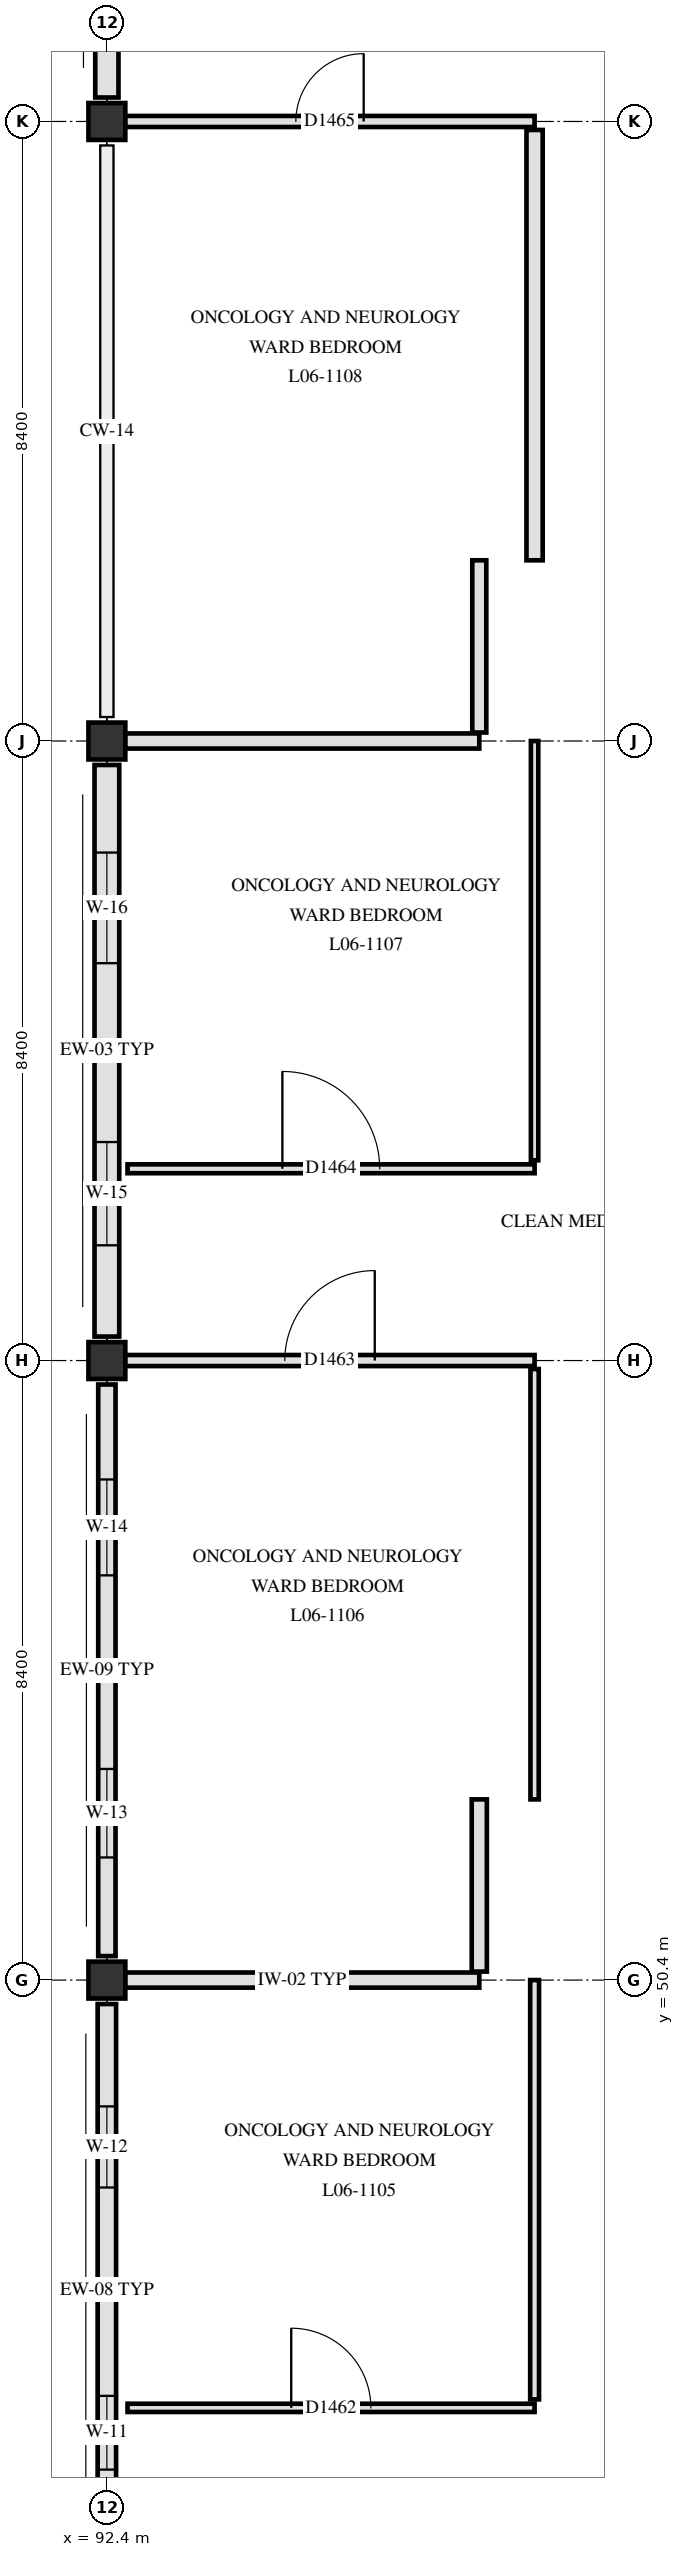
"""IFC4 building model, lengths in metres.
Left out: names, types, materials, properties, quantities, classifications, styles, units other than length and angle.
Written with IfcOpenShell. Run it as: python <this file> out.ifc"""

import sys

from ifc_helpers import new_model, si_unit, direction, frame, frame_2d, origin, origin_2d, place, context, subcontext, project, spatial, rectangle, extrude, element, fill, save


model = new_model("IFC4")
c1 = context("Model", 3, precision=1e-05, world=origin(), true_north=direction((0.0, 1.0)))
c2 = subcontext(c1, "Body", "Model", "MODEL_VIEW")
j1 = project(units=[si_unit("LENGTHUNIT", "METRE"), si_unit("PLANEANGLEUNIT", "RADIAN")], contexts=[c1])
p1 = place(None, origin())
s1 = spatial("IfcSite", under=j1, at=p1, CompositionType="ELEMENT")
p2 = place(p1, origin())
s2 = spatial("IfcBuilding", under=s1, at=p2, CompositionType="ELEMENT")
p3 = place(p2, frame((0.0, 0.0, 26.4)))
s3 = spatial("IfcBuildingStorey", under=s2, at=p3, CompositionType="ELEMENT", Elevation=26.4)
for number, where, z_axis, x_axis in (
    (1, (92.4, 50.4, 0.0), (0.0, 0.0, 1.0), (1.0, 0.0, 0.0)),
    (2, (92.4, 58.8, 0.0), (0.0, 0.0, 1.0), (1.0, 0.0, 0.0)),
    (3, (92.4, 67.2, 0.0), (0.0, 0.0, 1.0), (1.0, 0.0, 0.0)),
    (4, (92.4, 75.6, 0.0), (0.0, 0.0, 1.0), (1.0, 0.0, 0.0)),
):
    element("IfcColumn", number, at=place(p3, frame(where, z_axis=z_axis, x_axis=x_axis)), inside=s3, PredefinedType="COLUMN", context=c2, shape_type="SweptSolid", body=[
        extrude(rectangle(XDim=0.5, YDim=0.5, at=origin_2d()), origin(), (0.0, 0.0, 1.0), 3.9),
    ])
p4 = place(p3, frame((92.4, 42.325, 0.0), z_axis=(0.0, 0.0, 1.0), x_axis=(0.0, 1.0, 0.0)))
e5 = element("IfcWall", 5, at=p4, inside=s3, PredefinedType="SOLIDWALL", context=c2, shape_type="SweptSolid", body=[
    extrude(rectangle(XDim=7.75, YDim=0.25, at=frame_2d((3.875, 0.0))), origin(), (0.0, 0.0, 1.0), 3.38),
])
p5 = place(p4, frame((1.438, 0.0, 0.85)))
e6 = element("IfcOpeningElement", 6, at=p5, cuts=e5, PredefinedType="OPENING", context=c2, shape_type="SweptSolid", body=[
    extrude(rectangle(XDim=1.0, YDim=1.42, at=frame_2d((0.5, 0.71))), frame((0.0, 0.135, 0.0), z_axis=(0.0, -1.0, 0.0), x_axis=(1.0, 0.0, 0.0)), (0.0, 0.0, 1.0), 0.27),
])
p6 = place(p4, frame((5.262, 0.0, 0.85)))
e7 = element("IfcOpeningElement", 7, at=p6, cuts=e5, PredefinedType="OPENING", context=c2, shape_type="SweptSolid", body=[
    extrude(rectangle(XDim=1.1, YDim=1.42, at=frame_2d((0.55, 0.71))), frame((0.0, 0.135, 0.0), z_axis=(0.0, -1.0, 0.0), x_axis=(1.0, 0.0, 0.0)), (0.0, 0.0, 1.0), 0.27),
])
p7 = place(p3, frame((92.4, 50.725, 0.0), z_axis=(0.0, 0.0, 1.0), x_axis=(0.0, 1.0, 0.0)))
e8 = element("IfcWall", 8, at=p7, inside=s3, PredefinedType="SOLIDWALL", context=c2, shape_type="SweptSolid", body=[
    extrude(rectangle(XDim=7.75, YDim=0.235, at=frame_2d((3.875, 0.0))), origin(), (0.0, 0.0, 1.0), 3.38),
])
p8 = place(p7, frame((1.337, 0.0, 0.85)))
e9 = element("IfcOpeningElement", 9, at=p8, cuts=e8, PredefinedType="OPENING", context=c2, shape_type="SweptSolid", body=[
    extrude(rectangle(XDim=1.2, YDim=1.42, at=frame_2d((0.6, 0.71))), frame((0.0, 0.127, 0.0), z_axis=(0.0, -1.0, 0.0), x_axis=(1.0, 0.0, 0.0)), (0.0, 0.0, 1.0), 0.255),
])
p9 = place(p7, frame((5.163, 0.0, 0.85)))
e10 = element("IfcOpeningElement", 10, at=p9, cuts=e8, PredefinedType="OPENING", context=c2, shape_type="SweptSolid", body=[
    extrude(rectangle(XDim=1.3, YDim=1.42, at=frame_2d((0.65, 0.71))), frame((0.0, 0.127, 0.0), z_axis=(0.0, -1.0, 0.0), x_axis=(1.0, 0.0, 0.0)), (0.0, 0.0, 1.0), 0.255),
])
p10 = place(p3, frame((92.4, 59.125, 0.0), z_axis=(0.0, 0.0, 1.0), x_axis=(0.0, 1.0, 0.0)))
e11 = element("IfcWall", 11, at=p10, inside=s3, PredefinedType="SOLIDWALL", context=c2, shape_type="SweptSolid", body=[
    extrude(rectangle(XDim=7.75, YDim=0.335, at=frame_2d((3.875, 0.0))), origin(), (0.0, 0.0, 1.0), 3.34),
])
p11 = place(p10, frame((1.238, 0.0, 0.85)))
e12 = element("IfcOpeningElement", 12, at=p11, cuts=e11, PredefinedType="OPENING", context=c2, shape_type="SweptSolid", body=[
    extrude(rectangle(XDim=1.4, YDim=1.42, at=frame_2d((0.7, 0.71))), frame((0.0, 0.177, 0.0), z_axis=(0.0, -1.0, 0.0), x_axis=(1.0, 0.0, 0.0)), (0.0, 0.0, 1.0), 0.355),
])
p12 = place(p10, frame((5.062, 0.0, 0.85)))
e13 = element("IfcOpeningElement", 13, at=p12, cuts=e11, PredefinedType="OPENING", context=c2, shape_type="SweptSolid", body=[
    extrude(rectangle(XDim=1.5, YDim=1.42, at=frame_2d((0.75, 0.71))), frame((0.0, 0.177, 0.0), z_axis=(0.0, -1.0, 0.0), x_axis=(1.0, 0.0, 0.0)), (0.0, 0.0, 1.0), 0.355),
])
p13 = place(p3, frame((92.4, 75.925, 0.0), z_axis=(0.0, 0.0, 1.0), x_axis=(0.0, 1.0, 0.0)))
e14 = element("IfcWall", 14, at=p13, inside=s3, PredefinedType="SOLIDWALL", context=c2, shape_type="SweptSolid", body=[
    extrude(rectangle(XDim=7.75, YDim=0.315, at=frame_2d((3.875, 0.0))), origin(), (0.0, 0.0, 1.0), 3.34),
])
p14 = place(p13, frame((1.137, 0.0, 0.85)))
e15 = element("IfcOpeningElement", 15, at=p14, cuts=e14, PredefinedType="OPENING", context=c2, shape_type="SweptSolid", body=[
    extrude(rectangle(XDim=1.6, YDim=1.42, at=frame_2d((0.8, 0.71))), frame((0.0, 0.167, 0.0), z_axis=(0.0, -1.0, 0.0), x_axis=(1.0, 0.0, 0.0)), (0.0, 0.0, 1.0), 0.335),
])
p15 = place(p13, frame((4.962, 0.0, 0.85)))
e16 = element("IfcOpeningElement", 16, at=p15, cuts=e14, PredefinedType="OPENING", context=c2, shape_type="SweptSolid", body=[
    extrude(rectangle(XDim=1.7, YDim=1.42, at=frame_2d((0.85, 0.71))), frame((0.0, 0.167, 0.0), z_axis=(0.0, -1.0, 0.0), x_axis=(1.0, 0.0, 0.0)), (0.0, 0.0, 1.0), 0.335),
])
p16 = place(p3, frame((92.68, 44.6, 0.0), z_axis=(0.0, 0.0, 1.0), x_axis=(1.0, 0.0, 0.0)))
e17 = element("IfcWall", 17, at=p16, inside=s3, PredefinedType="PARTITIONING", context=c2, shape_type="SweptSolid", body=[
    extrude(rectangle(XDim=5.52, YDim=0.112, at=frame_2d((2.76, 0.0))), origin(), (0.0, 0.0, 1.0), 3.61),
])
p17 = place(p16, frame((2.22, 0.0, 0.0)))
e18 = element("IfcOpeningElement", 18, at=p17, cuts=e17, PredefinedType="OPENING", context=c2, shape_type="SweptSolid", body=[
    extrude(rectangle(XDim=1.08, YDim=2.12, at=frame_2d((0.54, 1.06))), frame((0.0, 0.066, 0.0), z_axis=(0.0, -1.0, 0.0), x_axis=(1.0, 0.0, 0.0)), (0.0, 0.0, 1.0), 0.132),
])
p18 = place(p3, frame((92.645, 50.4, 0.0), z_axis=(0.0, 0.0, 1.0), x_axis=(1.0, 0.0, 0.0)))
e19 = element("IfcWall", 19, at=p18, inside=s3, PredefinedType="PARTITIONING", context=c2, shape_type="SweptSolid", body=[
    extrude(rectangle(XDim=4.805, YDim=0.205, at=frame_2d((2.402, 0.0))), origin(), (0.0, 0.0, 1.0), 3.21),
])
p19 = place(p3, frame((92.645, 58.8, 0.0), z_axis=(0.0, 0.0, 1.0), x_axis=(1.0, 0.0, 0.0)))
e20 = element("IfcWall", 20, at=p19, inside=s3, PredefinedType="PARTITIONING", context=c2, shape_type="SweptSolid", body=[
    extrude(rectangle(XDim=5.555, YDim=0.15, at=frame_2d((2.777, 0.0))), origin(), (0.0, 0.0, 1.0), 3.21),
])
p20 = place(p19, frame((2.167, 0.0, 0.0)))
e21 = element("IfcOpeningElement", 21, at=p20, cuts=e20, PredefinedType="OPENING", context=c2, shape_type="SweptSolid", body=[
    extrude(rectangle(XDim=1.22, YDim=2.18, at=frame_2d((0.61, 1.09))), frame((0.0, 0.085, 0.0), z_axis=(0.0, -1.0, 0.0), x_axis=(1.0, 0.0, 0.0)), (0.0, 0.0, 1.0), 0.17),
])
p21 = place(p3, frame((92.68, 61.4, 0.0), z_axis=(0.0, 0.0, 1.0), x_axis=(1.0, 0.0, 0.0)))
e22 = element("IfcWall", 22, at=p21, inside=s3, PredefinedType="PARTITIONING", context=c2, shape_type="SweptSolid", body=[
    extrude(rectangle(XDim=5.52, YDim=0.12, at=frame_2d((2.76, 0.0))), origin(), (0.0, 0.0, 1.0), 3.61),
])
p22 = place(p21, frame((2.1, 0.0, 0.0)))
e23 = element("IfcOpeningElement", 23, at=p22, cuts=e22, PredefinedType="OPENING", context=c2, shape_type="SweptSolid", body=[
    extrude(rectangle(XDim=1.32, YDim=2.18, at=frame_2d((0.66, 1.09))), frame((0.0, 0.07, 0.0), z_axis=(0.0, -1.0, 0.0), x_axis=(1.0, 0.0, 0.0)), (0.0, 0.0, 1.0), 0.14),
])
p23 = place(p3, frame((92.645, 67.2, 0.0), z_axis=(0.0, 0.0, 1.0), x_axis=(1.0, 0.0, 0.0)))
e24 = element("IfcWall", 24, at=p23, inside=s3, PredefinedType="PARTITIONING", context=c2, shape_type="SweptSolid", body=[
    extrude(rectangle(XDim=4.805, YDim=0.205, at=frame_2d((2.402, 0.0))), origin(), (0.0, 0.0, 1.0), 3.21),
])
p24 = place(p3, frame((92.645, 75.6, 0.0), z_axis=(0.0, 0.0, 1.0), x_axis=(1.0, 0.0, 0.0)))
e25 = element("IfcWall", 25, at=p24, inside=s3, PredefinedType="PARTITIONING", context=c2, shape_type="SweptSolid", body=[
    extrude(rectangle(XDim=5.555, YDim=0.15, at=frame_2d((2.777, 0.0))), origin(), (0.0, 0.0, 1.0), 3.21),
])
p25 = place(p24, frame((2.317, 0.0, 0.0)))
e26 = element("IfcOpeningElement", 26, at=p25, cuts=e25, PredefinedType="OPENING", context=c2, shape_type="SweptSolid", body=[
    extrude(rectangle(XDim=0.92, YDim=2.08, at=frame_2d((0.46, 1.04))), frame((0.0, 0.085, 0.0), z_axis=(0.0, -1.0, 0.0), x_axis=(1.0, 0.0, 0.0)), (0.0, 0.0, 1.0), 0.17),
])
p26 = place(p3, frame((97.45, 50.515, 0.0), z_axis=(0.0, 0.0, 1.0), x_axis=(0.0, 1.0, 0.0)))
e27 = element("IfcWall", 27, at=p26, inside=s3, PredefinedType="PARTITIONING", context=c2, shape_type="SweptSolid", body=[
    extrude(rectangle(XDim=2.335, YDim=0.205, at=frame_2d((1.167, 0.0))), origin(), (0.0, 0.0, 1.0), 3.61),
])
p27 = place(p3, frame((97.45, 67.315, 0.0), z_axis=(0.0, 0.0, 1.0), x_axis=(0.0, 1.0, 0.0)))
e28 = element("IfcWall", 28, at=p27, inside=s3, PredefinedType="PARTITIONING", context=c2, shape_type="SweptSolid", body=[
    extrude(rectangle(XDim=2.335, YDim=0.19, at=frame_2d((1.167, 0.0))), origin(), (0.0, 0.0, 1.0), 3.61),
])
p28 = place(p3, frame((98.2, 44.715, 0.0), z_axis=(0.0, 0.0, 1.0), x_axis=(0.0, 1.0, 0.0)))
e29 = element("IfcWall", 29, at=p28, inside=s3, PredefinedType="PARTITIONING", context=c2, shape_type="SweptSolid", body=[
    extrude(rectangle(XDim=5.685, YDim=0.12, at=frame_2d((2.842, 0.0))), origin(), (0.0, 0.0, 1.0), 3.21),
])
p29 = place(p3, frame((98.2, 52.85, 0.0), z_axis=(0.0, 0.0, 1.0), x_axis=(0.0, 1.0, 0.0)))
e30 = element("IfcWall", 30, at=p29, inside=s3, PredefinedType="PARTITIONING", context=c2, shape_type="SweptSolid", body=[
    extrude(rectangle(XDim=5.835, YDim=0.112, at=frame_2d((2.917, 0.0))), origin(), (0.0, 0.0, 1.0), 3.34),
])
p30 = place(p3, frame((98.2, 61.515, 0.0), z_axis=(0.0, 0.0, 1.0), x_axis=(0.0, 1.0, 0.0)))
e31 = element("IfcWall", 31, at=p30, inside=s3, PredefinedType="PARTITIONING", context=c2, shape_type="SweptSolid", body=[
    extrude(rectangle(XDim=5.685, YDim=0.1, at=frame_2d((2.843, 0.0))), origin(), (0.0, 0.0, 1.0), 3.21),
])
p31 = place(p3, frame((98.2, 69.65, 0.0), z_axis=(0.0, 0.0, 1.0), x_axis=(0.0, 1.0, 0.0)))
e32 = element("IfcWall", 32, at=p31, inside=s3, PredefinedType="PARTITIONING", context=c2, shape_type="SweptSolid", body=[
    extrude(rectangle(XDim=5.835, YDim=0.22, at=frame_2d((2.917, 0.0))), origin(), (0.0, 0.0, 1.0), 3.34),
])
p32 = place(p5, origin())
e33 = element("IfcWindow", 33, at=p32, inside=s3, PartitioningType="SINGLE_PANEL", PredefinedType="WINDOW", context=c2, shape_type="SweptSolid", body=[
    extrude(rectangle(XDim=1.0, YDim=1.42, at=frame_2d((0.5, 0.71))), frame((0.0, 0.03, 0.0), z_axis=(0.0, -1.0, 0.0), x_axis=(1.0, 0.0, 0.0)), (0.0, 0.0, 1.0), 0.06),
])
fill(e6, e33)
p33 = place(p6, origin())
e34 = element("IfcWindow", 34, at=p33, inside=s3, PartitioningType="SINGLE_PANEL", PredefinedType="WINDOW", context=c2, shape_type="SweptSolid", body=[
    extrude(rectangle(XDim=1.1, YDim=1.42, at=frame_2d((0.55, 0.71))), frame((0.0, 0.03, 0.0), z_axis=(0.0, -1.0, 0.0), x_axis=(1.0, 0.0, 0.0)), (0.0, 0.0, 1.0), 0.06),
])
fill(e7, e34)
p34 = place(p8, origin())
e35 = element("IfcWindow", 35, at=p34, inside=s3, PartitioningType="SINGLE_PANEL", PredefinedType="WINDOW", context=c2, shape_type="SweptSolid", body=[
    extrude(rectangle(XDim=1.2, YDim=1.42, at=frame_2d((0.6, 0.71))), frame((0.0, 0.03, 0.0), z_axis=(0.0, -1.0, 0.0), x_axis=(1.0, 0.0, 0.0)), (0.0, 0.0, 1.0), 0.06),
])
fill(e9, e35)
p35 = place(p9, origin())
e36 = element("IfcWindow", 36, at=p35, inside=s3, PartitioningType="SINGLE_PANEL", PredefinedType="WINDOW", context=c2, shape_type="SweptSolid", body=[
    extrude(rectangle(XDim=1.3, YDim=1.42, at=frame_2d((0.65, 0.71))), frame((0.0, 0.03, 0.0), z_axis=(0.0, -1.0, 0.0), x_axis=(1.0, 0.0, 0.0)), (0.0, 0.0, 1.0), 0.06),
])
fill(e10, e36)
p36 = place(p11, origin())
e37 = element("IfcWindow", 37, at=p36, inside=s3, PartitioningType="SINGLE_PANEL", PredefinedType="WINDOW", context=c2, shape_type="SweptSolid", body=[
    extrude(rectangle(XDim=1.4, YDim=1.42, at=frame_2d((0.7, 0.71))), frame((0.0, 0.03, 0.0), z_axis=(0.0, -1.0, 0.0), x_axis=(1.0, 0.0, 0.0)), (0.0, 0.0, 1.0), 0.06),
])
fill(e12, e37)
p37 = place(p12, origin())
e38 = element("IfcWindow", 38, at=p37, inside=s3, PartitioningType="SINGLE_PANEL", PredefinedType="WINDOW", context=c2, shape_type="SweptSolid", body=[
    extrude(rectangle(XDim=1.5, YDim=1.42, at=frame_2d((0.75, 0.71))), frame((0.0, 0.03, 0.0), z_axis=(0.0, -1.0, 0.0), x_axis=(1.0, 0.0, 0.0)), (0.0, 0.0, 1.0), 0.06),
])
fill(e13, e38)
p38 = place(p17, origin())
e39 = element("IfcDoor", 39, at=p38, inside=s3, OperationType="SINGLE_SWING_LEFT", PredefinedType="DOOR", context=c2, shape_type="SweptSolid", body=[
    extrude(rectangle(XDim=1.08, YDim=2.12, at=frame_2d((0.54, 1.06))), frame((0.0, 0.025, 0.0), z_axis=(0.0, -1.0, 0.0), x_axis=(1.0, 0.0, 0.0)), (0.0, 0.0, 1.0), 0.05),
])
fill(e18, e39)
p39 = place(p20, origin())
e40 = element("IfcDoor", 40, at=p39, inside=s3, OperationType="SINGLE_SWING_RIGHT", PredefinedType="DOOR", context=c2, shape_type="SweptSolid", body=[
    extrude(rectangle(XDim=1.22, YDim=2.18, at=frame_2d((0.61, 1.09))), frame((0.0, 0.025, 0.0), z_axis=(0.0, -1.0, 0.0), x_axis=(1.0, 0.0, 0.0)), (0.0, 0.0, 1.0), 0.05),
])
fill(e21, e40)
p40 = place(p22, origin())
e41 = element("IfcDoor", 41, at=p40, inside=s3, OperationType="SINGLE_SWING_LEFT", PredefinedType="DOOR", context=c2, shape_type="SweptSolid", body=[
    extrude(rectangle(XDim=1.32, YDim=2.18, at=frame_2d((0.66, 1.09))), frame((0.0, 0.025, 0.0), z_axis=(0.0, -1.0, 0.0), x_axis=(1.0, 0.0, 0.0)), (0.0, 0.0, 1.0), 0.05),
])
fill(e23, e41)
p41 = place(p25, origin())
e42 = element("IfcDoor", 42, at=p41, inside=s3, OperationType="SINGLE_SWING_RIGHT", PredefinedType="DOOR", context=c2, shape_type="SweptSolid", body=[
    extrude(rectangle(XDim=0.92, YDim=2.08, at=frame_2d((0.46, 1.04))), frame((0.0, 0.025, 0.0), z_axis=(0.0, -1.0, 0.0), x_axis=(1.0, 0.0, 0.0)), (0.0, 0.0, 1.0), 0.05),
])
fill(e26, e42)
save(model, sys.argv[1])
